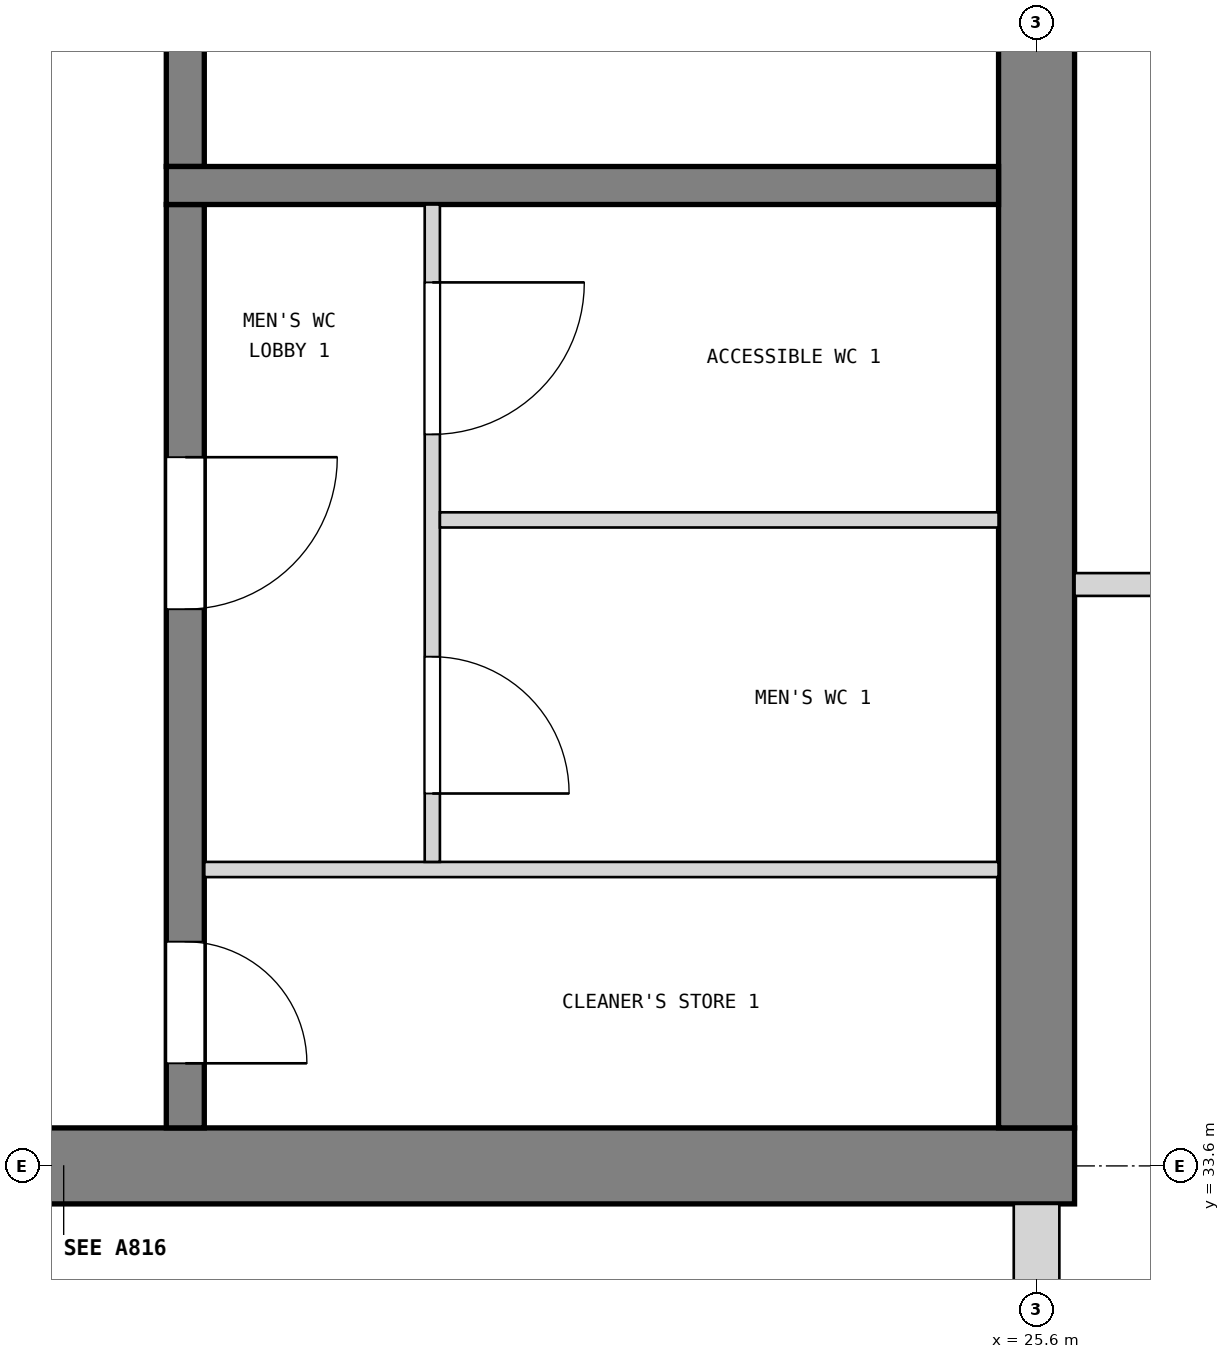
"""IFC4 building model, lengths in metres.
Left out: names, types, materials, properties, quantities, classifications, styles, units other than length and angle.
Written with IfcOpenShell. Run it as: python <this file> out.ifc"""

import sys

from ifc_helpers import new_model, si_unit, direction, frame, frame_2d, origin, place, context, subcontext, project, spatial, rectangle, extrude, element, fill, save


model = new_model("IFC4")
c1 = context("Model", 3, precision=1e-05, world=origin(), true_north=direction((0.0, 1.0)))
c2 = subcontext(c1, "Body", "Model", "MODEL_VIEW")
j1 = project(units=[si_unit("LENGTHUNIT", "METRE"), si_unit("PLANEANGLEUNIT", "RADIAN")], contexts=[c1])
p1 = place(None, origin())
s1 = spatial("IfcSite", under=j1, at=p1, CompositionType="ELEMENT")
p2 = place(p1, origin())
s2 = spatial("IfcBuilding", under=s1, at=p2, CompositionType="ELEMENT")
p3 = place(p2, frame((0.0, 0.0, 56.1)))
s3 = spatial("IfcBuildingStorey", under=s2, at=p3, CompositionType="ELEMENT", Elevation=56.1)
p4 = place(p3, frame((12.55, 33.6, 0.0), z_axis=(0.0, 0.0, 1.0), x_axis=(1.0, 0.0, 0.0)))
e1 = element("IfcWall", 1, at=p4, inside=s3, PredefinedType="SHEAR", context=c2, shape_type="SweptSolid", body=[
    extrude(rectangle(XDim=13.3, YDim=0.5, at=frame_2d((6.65, 0.0))), origin(), (0.0, 0.0, 1.0), 3.9),
])
p5 = place(p4, frame((1.85, 0.0, 1.0)))
e2 = element("IfcOpeningElement", 2, at=p5, cuts=e1, PredefinedType="OPENING", context=c2, shape_type="SweptSolid", body=[
    extrude(rectangle(XDim=0.4, YDim=2.0, at=frame_2d((0.2, 1.0))), frame((0.0, 0.26, 0.0), z_axis=(0.0, -1.0, 0.0), x_axis=(1.0, 0.0, 0.0)), (0.0, 0.0, 1.0), 0.52),
])
p6 = place(p3, frame((25.6, 33.85, 0.0), z_axis=(0.0, 0.0, 1.0), x_axis=(0.0, 1.0, 0.0)))
e3 = element("IfcWall", 3, at=p6, inside=s3, PredefinedType="SHEAR", context=c2, shape_type="SweptSolid", body=[
    extrude(rectangle(XDim=18.7, YDim=0.5, at=frame_2d((9.35, 0.0))), origin(), (0.0, 0.0, 1.0), 3.9),
])
p7 = place(p6, frame((8.35, 0.0, 0.0)))
e4 = element("IfcOpeningElement", 4, at=p7, cuts=e3, PredefinedType="OPENING", context=c2, shape_type="SweptSolid", body=[
    extrude(rectangle(XDim=2.0, YDim=2.1, at=frame_2d((1.0, 1.05))), frame((0.0, 0.26, 0.0), z_axis=(0.0, -1.0, 0.0), x_axis=(1.0, 0.0, 0.0)), (0.0, 0.0, 1.0), 0.52),
])
p8 = place(p3, frame((25.6, 31.0, 0.0), z_axis=(0.0, 0.0, 1.0), x_axis=(0.0, 1.0, 0.0)))
e5 = element("IfcWall", 5, at=p8, inside=s3, PredefinedType="SOLIDWALL", context=c2, shape_type="SweptSolid", body=[
    extrude(rectangle(XDim=2.35, YDim=0.3, at=frame_2d((1.175, 0.0))), origin(), (0.0, 0.0, 1.0), 2.88),
])
p9 = place(p3, frame((20.0, 33.85, 0.0), z_axis=(0.0, 0.0, 1.0), x_axis=(0.0, 1.0, 0.0)))
e6 = element("IfcWall", 6, at=p9, inside=s3, PredefinedType="SOLIDWALL", context=c2, shape_type="SweptSolid", body=[
    extrude(rectangle(XDim=6.075, YDim=0.25, at=frame_2d((3.038, 0.0))), origin(), (0.0, 0.0, 1.0), 3.6),
])
p10 = place(p9, frame((0.425, 0.0, 0.0)))
e7 = element("IfcOpeningElement", 7, at=p10, cuts=e6, PredefinedType="OPENING", context=c2, shape_type="SweptSolid", body=[
    extrude(rectangle(XDim=0.8, YDim=2.1, at=frame_2d((0.4, 1.05))), frame((0.0, 0.135, 0.0), z_axis=(0.0, -1.0, 0.0), x_axis=(1.0, 0.0, 0.0)), (0.0, 0.0, 1.0), 0.27),
])
p11 = place(p9, frame((3.413, 0.0, 0.0)))
e8 = element("IfcOpeningElement", 8, at=p11, cuts=e6, PredefinedType="OPENING", context=c2, shape_type="SweptSolid", body=[
    extrude(rectangle(XDim=1.0, YDim=2.1, at=frame_2d((0.5, 1.05))), frame((0.0, 0.135, 0.0), z_axis=(0.0, -1.0, 0.0), x_axis=(1.0, 0.0, 0.0)), (0.0, 0.0, 1.0), 0.27),
])
p12 = place(p3, frame((20.0, 40.175, 0.0), z_axis=(0.0, 0.0, 1.0), x_axis=(0.0, 1.0, 0.0)))
e9 = element("IfcWall", 9, at=p12, inside=s3, PredefinedType="SOLIDWALL", context=c2, shape_type="SweptSolid", body=[
    extrude(rectangle(XDim=6.05, YDim=0.25, at=frame_2d((3.025, 0.0))), origin(), (0.0, 0.0, 1.0), 3.6),
])
p13 = place(p12, frame((2.025, 0.0, 0.0)))
e10 = element("IfcOpeningElement", 10, at=p13, cuts=e9, PredefinedType="OPENING", context=c2, shape_type="SweptSolid", body=[
    extrude(rectangle(XDim=2.0, YDim=2.1, at=frame_2d((1.0, 1.05))), frame((0.0, 0.135, 0.0), z_axis=(0.0, -1.0, 0.0), x_axis=(1.0, 0.0, 0.0)), (0.0, 0.0, 1.0), 0.27),
])
p14 = place(p3, frame((19.875, 40.05, 0.0), z_axis=(0.0, 0.0, 1.0), x_axis=(1.0, 0.0, 0.0)))
e11 = element("IfcWall", 11, at=p14, inside=s3, PredefinedType="SOLIDWALL", context=c2, shape_type="SweptSolid", body=[
    extrude(rectangle(XDim=5.475, YDim=0.25, at=frame_2d((2.738, 0.0))), origin(), (0.0, 0.0, 1.0), 3.6),
])
p15 = place(p3, frame((20.125, 35.55, 0.0), z_axis=(0.0, 0.0, 1.0), x_axis=(1.0, 0.0, 0.0)))
e12 = element("IfcWall", 12, at=p15, inside=s3, PredefinedType="PARTITIONING", context=c2, shape_type="SweptSolid", body=[
    extrude(rectangle(XDim=5.225, YDim=0.1, at=frame_2d((2.613, 0.0))), origin(), (0.0, 0.0, 1.0), 3.6),
])
p16 = place(p3, frame((21.625, 35.6, 0.0), z_axis=(0.0, 0.0, 1.0), x_axis=(0.0, 1.0, 0.0)))
e13 = element("IfcWall", 13, at=p16, inside=s3, PredefinedType="PARTITIONING", context=c2, shape_type="SweptSolid", body=[
    extrude(rectangle(XDim=4.325, YDim=0.1, at=frame_2d((2.163, 0.0))), origin(), (0.0, 0.0, 1.0), 3.6),
])
p17 = place(p16, frame((0.45, 0.0, 0.0)))
e14 = element("IfcOpeningElement", 14, at=p17, cuts=e13, PredefinedType="OPENING", context=c2, shape_type="SweptSolid", body=[
    extrude(rectangle(XDim=0.9, YDim=2.1, at=frame_2d((0.45, 1.05))), frame((0.0, 0.06, 0.0), z_axis=(0.0, -1.0, 0.0), x_axis=(1.0, 0.0, 0.0)), (0.0, 0.0, 1.0), 0.12),
])
p18 = place(p16, frame((2.812, 0.0, 0.0)))
e15 = element("IfcOpeningElement", 15, at=p18, cuts=e13, PredefinedType="OPENING", context=c2, shape_type="SweptSolid", body=[
    extrude(rectangle(XDim=1.0, YDim=2.1, at=frame_2d((0.5, 1.05))), frame((0.0, 0.06, 0.0), z_axis=(0.0, -1.0, 0.0), x_axis=(1.0, 0.0, 0.0)), (0.0, 0.0, 1.0), 0.12),
])
p19 = place(p3, frame((21.675, 37.85, 0.0), z_axis=(0.0, 0.0, 1.0), x_axis=(1.0, 0.0, 0.0)))
e16 = element("IfcWall", 16, at=p19, inside=s3, PredefinedType="PARTITIONING", context=c2, shape_type="SweptSolid", body=[
    extrude(rectangle(XDim=3.675, YDim=0.1, at=frame_2d((1.837, 0.0))), origin(), (0.0, 0.0, 1.0), 3.6),
])
p20 = place(p3, frame((25.85, 37.425, 0.0), z_axis=(0.0, 0.0, 1.0), x_axis=(1.0, 0.0, 0.0)))
e17 = element("IfcWall", 17, at=p20, inside=s3, PredefinedType="PARTITIONING", context=c2, shape_type="SweptSolid", body=[
    extrude(rectangle(XDim=5.97, YDim=0.15, at=frame_2d((2.985, 0.0))), origin(), (0.0, 0.0, 1.0), 3.68),
])
p21 = place(p20, frame((2.45, 0.0, 0.0)))
e18 = element("IfcOpeningElement", 18, at=p21, cuts=e17, PredefinedType="OPENING", context=c2, shape_type="SweptSolid", body=[
    extrude(rectangle(XDim=1.0, YDim=2.1, at=frame_2d((0.5, 1.05))), frame((0.0, 0.085, 0.0), z_axis=(0.0, -1.0, 0.0), x_axis=(1.0, 0.0, 0.0)), (0.0, 0.0, 1.0), 0.17),
])
p22 = place(p10, frame((0.8, 0.0, 0.0), z_axis=(0.0, 0.0, 1.0), x_axis=(-1.0, 0.0, 0.0)))
e19 = element("IfcDoor", 19, at=p22, inside=s3, OperationType="SINGLE_SWING_RIGHT", PredefinedType="DOOR", context=c2, shape_type="SweptSolid", body=[
    extrude(rectangle(XDim=0.8, YDim=2.1, at=frame_2d((0.4, 1.05))), frame((0.0, 0.025, 0.0), z_axis=(0.0, -1.0, 0.0), x_axis=(1.0, 0.0, 0.0)), (0.0, 0.0, 1.0), 0.05),
])
fill(e7, e19)
p23 = place(p11, frame((1.0, 0.0, 0.0), z_axis=(0.0, 0.0, 1.0), x_axis=(-1.0, 0.0, 0.0)))
e20 = element("IfcDoor", 20, at=p23, inside=s3, OperationType="SINGLE_SWING_LEFT", PredefinedType="DOOR", context=c2, shape_type="SweptSolid", body=[
    extrude(rectangle(XDim=1.0, YDim=2.1, at=frame_2d((0.5, 1.05))), frame((0.0, 0.025, 0.0), z_axis=(0.0, -1.0, 0.0), x_axis=(1.0, 0.0, 0.0)), (0.0, 0.0, 1.0), 0.05),
])
fill(e8, e20)
p24 = place(p17, frame((0.9, 0.0, 0.0), z_axis=(0.0, 0.0, 1.0), x_axis=(-1.0, 0.0, 0.0)))
e21 = element("IfcDoor", 21, at=p24, inside=s3, OperationType="SINGLE_SWING_RIGHT", PredefinedType="DOOR", context=c2, shape_type="SweptSolid", body=[
    extrude(rectangle(XDim=0.9, YDim=2.1, at=frame_2d((0.45, 1.05))), frame((0.0, 0.025, 0.0), z_axis=(0.0, -1.0, 0.0), x_axis=(1.0, 0.0, 0.0)), (0.0, 0.0, 1.0), 0.05),
])
fill(e14, e21)
p25 = place(p18, frame((1.0, 0.0, 0.0), z_axis=(0.0, 0.0, 1.0), x_axis=(-1.0, 0.0, 0.0)))
e22 = element("IfcDoor", 22, at=p25, inside=s3, OperationType="SINGLE_SWING_LEFT", PredefinedType="DOOR", context=c2, shape_type="SweptSolid", body=[
    extrude(rectangle(XDim=1.0, YDim=2.1, at=frame_2d((0.5, 1.05))), frame((0.0, 0.025, 0.0), z_axis=(0.0, -1.0, 0.0), x_axis=(1.0, 0.0, 0.0)), (0.0, 0.0, 1.0), 0.05),
])
fill(e15, e22)
save(model, sys.argv[1])
